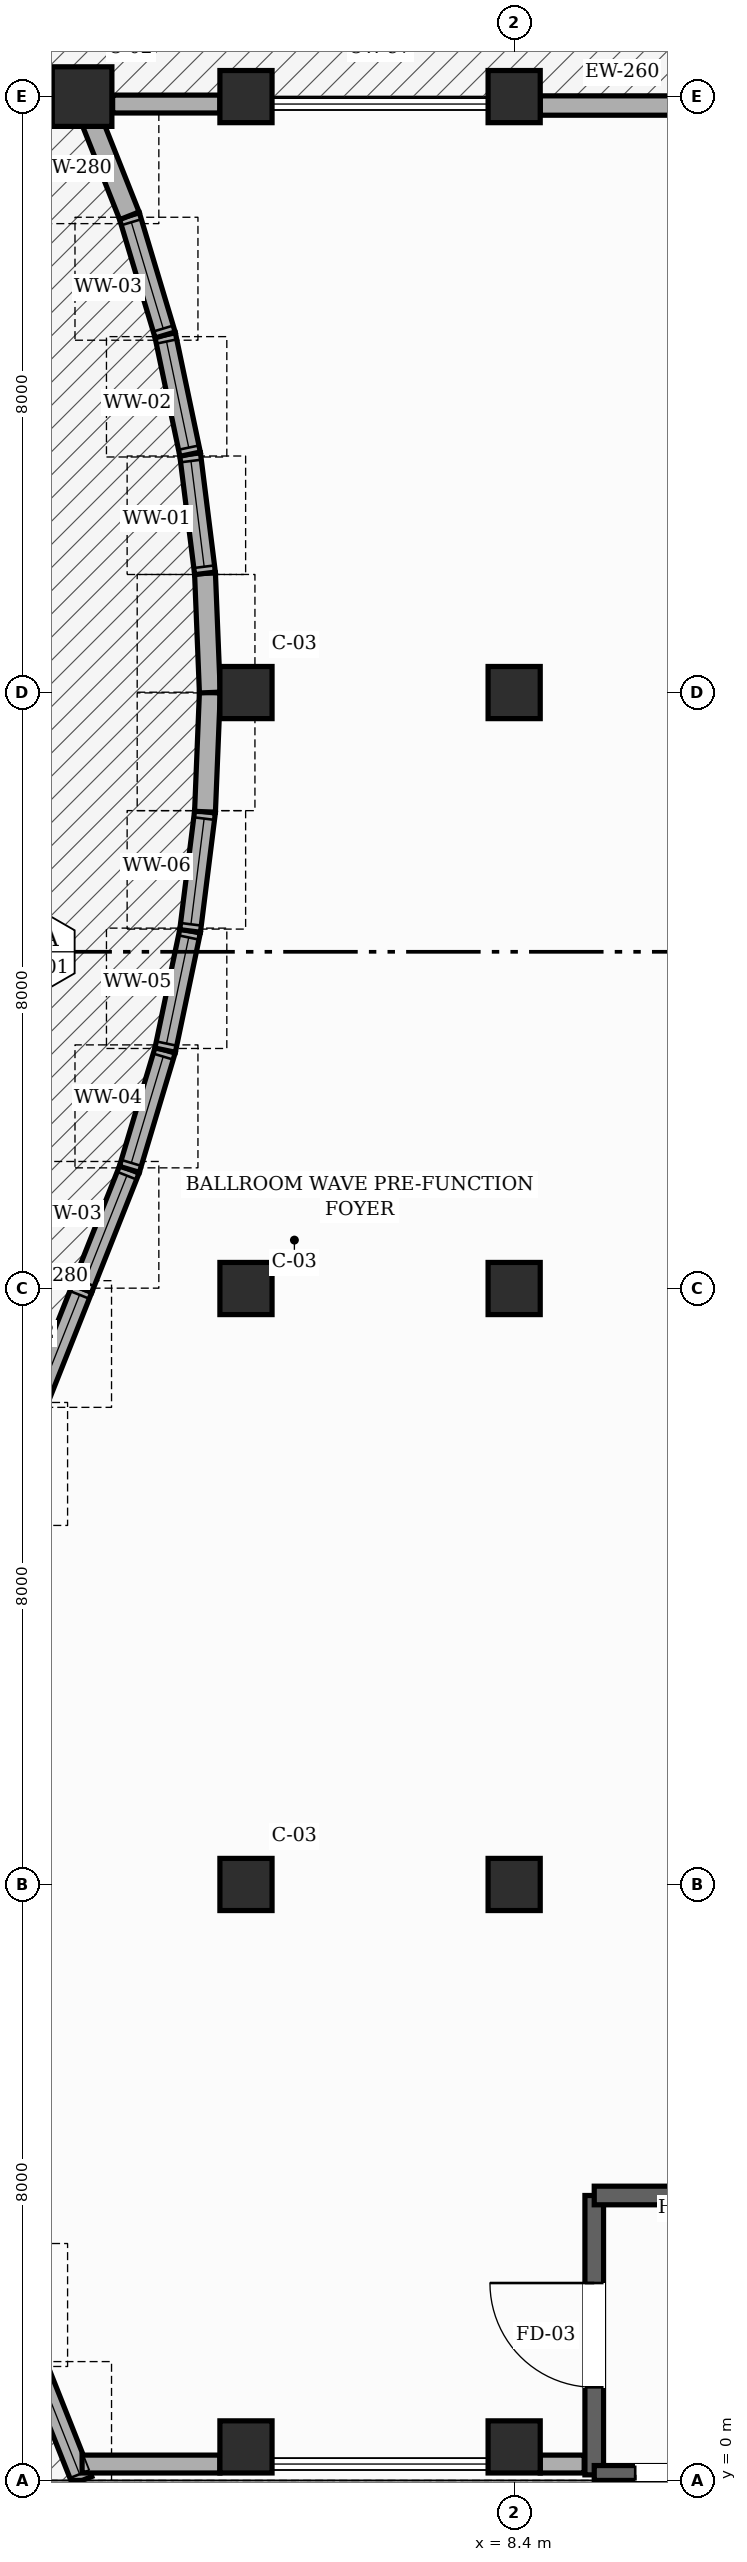
"""IFC4 building model, lengths in metres.
Left out: names, types, materials, properties, quantities, classifications, styles, units other than length and angle.
Written with IfcOpenShell. Run it as: python <this file> out.ifc"""

import sys

from ifc_helpers import new_model, si_unit, direction, frame, frame_2d, origin, origin_2d, place, context, subcontext, project, spatial, polyline, rectangle, hollow_rectangle, outline, extrude, element, fill, save


model = new_model("IFC4")
c1 = context("Model", 3, precision=1e-05, world=origin(), true_north=direction((0.0, 1.0)))
c2 = subcontext(c1, "Body", "Model", "MODEL_VIEW")
j1 = project(units=[si_unit("LENGTHUNIT", "METRE"), si_unit("PLANEANGLEUNIT", "RADIAN")], contexts=[c1])
p1 = place(None, origin())
s1 = spatial("IfcSite", under=j1, at=p1, CompositionType="ELEMENT")
p2 = place(p1, origin())
s2 = spatial("IfcBuilding", under=s1, at=p2, CompositionType="ELEMENT")
p3 = place(p2, origin())
s3 = spatial("IfcBuildingStorey", under=s2, at=p3, CompositionType="ELEMENT", Elevation=0.0)
p4 = place(p3, frame((2.6, 32.0, 0.0), z_axis=(0.0, 0.0, 1.0), x_axis=(1.0, 0.0, 0.0)))
e1 = element("IfcColumn", 1, at=p4, inside=s3, PredefinedType="COLUMN", context=c2, shape_type="SweptSolid", body=[
    extrude(hollow_rectangle(XDim=0.8, YDim=0.8, WallThickness=0.032, InnerFilletRadius=0.032, OuterFilletRadius=0.064, at=origin_2d()), origin(), (0.0, 0.0, 1.0), 5.15),
])
for number, where, z_axis, x_axis in (
    (2, (4.8, 0.45, 0.0), (0.0, 0.0, 1.0), (1.0, 0.0, 0.0)),
    (3, (4.8, 8.0, 0.0), (0.0, 0.0, 1.0), (1.0, 0.0, 0.0)),
    (4, (4.8, 16.0, 0.0), (0.0, 0.0, 1.0), (1.0, 0.0, 0.0)),
    (5, (4.8, 24.0, 0.0), (0.0, 0.0, 1.0), (1.0, 0.0, 0.0)),
    (6, (4.8, 32.0, 0.0), (0.0, 0.0, 1.0), (1.0, 0.0, 0.0)),
    (7, (8.4, 0.45, 0.0), (0.0, 0.0, 1.0), (1.0, 0.0, 0.0)),
    (8, (8.4, 8.0, 0.0), (0.0, 0.0, 1.0), (1.0, 0.0, 0.0)),
    (9, (8.4, 16.0, 0.0), (0.0, 0.0, 1.0), (1.0, 0.0, 0.0)),
    (10, (8.4, 24.0, 0.0), (0.0, 0.0, 1.0), (1.0, 0.0, 0.0)),
    (11, (8.4, 32.0, 0.0), (0.0, 0.0, 1.0), (1.0, 0.0, 0.0)),
):
    element("IfcColumn", number, at=place(p3, frame(where, z_axis=z_axis, x_axis=x_axis)), inside=s3, PredefinedType="COLUMN", context=c2, shape_type="SweptSolid", body=[
        extrude(hollow_rectangle(XDim=0.7, YDim=0.7, WallThickness=0.028, InnerFilletRadius=0.028, OuterFilletRadius=0.056, at=origin_2d()), origin(), (0.0, 0.0, 1.0), 5.4),
    ])
p5 = place(p3, frame((2.6, 0.0, 0.0), z_axis=(0.0, 0.0, 1.0), x_axis=(-0.368870803066, 0.92948067793, 0.0)))
e12 = element("IfcWall", 12, at=p5, inside=s3, PredefinedType="SOLIDWALL", context=c2, shape_type="SweptSolid", body=[
    extrude(outline(polyline([(0.0, 0.0), (1.721, 0.0), (1.72, 15.12), (1.505, 15.04), (1.29, 14.95), (1.075, 14.865), (0.86, 14.775), (0.645, 14.68), (0.43, 14.59), (0.215, 14.495), (0.0, 14.4), (0.0, 0.0)])), frame((0.0, 0.14, 0.0), z_axis=(0.0, -1.0, 0.0), x_axis=(1.0, 0.0, 0.0)), (0.0, 0.0, 1.0), 0.28),
])
p6 = place(p5, frame((0.09, 0.0, 1.125)))
e13 = element("IfcOpeningElement", 13, at=p6, cuts=e12, PredefinedType="OPENING", context=c2, shape_type="SweptSolid", body=[
    extrude(rectangle(XDim=1.54, YDim=1.65, at=frame_2d((0.77, 0.825))), frame((0.0, 0.15, 0.0), z_axis=(0.0, -1.0, 0.0), x_axis=(1.0, 0.0, 0.0)), (0.0, 0.0, 1.0), 0.3),
])
p7 = place(p3, frame((1.965, 14.4, 0.0), z_axis=(0.0, 0.0, 1.0), x_axis=(0.368870803066, 0.92948067793, 0.0)))
e14 = element("IfcWall", 14, at=p7, inside=s3, PredefinedType="SOLIDWALL", context=c2, shape_type="SweptSolid", body=[
    extrude(outline(polyline([(0.0, 0.0), (1.721, 0.0), (1.72, 13.145), (1.505, 13.105), (1.29, 13.075), (1.075, 13.045), (0.86, 13.025), (0.645, 13.01), (0.43, 13.0), (0.215, 13.0), (0.0, 13.005), (0.0, 0.0)])), frame((0.0, 0.14, 0.0), z_axis=(0.0, -1.0, 0.0), x_axis=(1.0, 0.0, 0.0)), (0.0, 0.0, 1.0), 0.28),
])
p8 = place(p7, frame((0.09, 0.0, 0.31)))
e15 = element("IfcOpeningElement", 15, at=p8, cuts=e14, PredefinedType="OPENING", context=c2, shape_type="SweptSolid", body=[
    extrude(rectangle(XDim=1.54, YDim=1.75, at=frame_2d((0.77, 0.875))), frame((0.0, 0.15, 0.0), z_axis=(0.0, -1.0, 0.0), x_axis=(1.0, 0.0, 0.0)), (0.0, 0.0, 1.0), 0.3),
])
p9 = place(p3, frame((2.6, 16.0, 0.0), z_axis=(0.0, 0.0, 1.0), x_axis=(0.368870803066, 0.92948067793, 0.0)))
e16 = element("IfcWall", 16, at=p9, inside=s3, PredefinedType="SOLIDWALL", context=c2, shape_type="SweptSolid", body=[
    extrude(outline(polyline([(0.0, 0.0), (1.721, 0.0), (1.72, 13.645), (1.505, 13.57), (1.29, 13.495), (1.075, 13.425), (0.86, 13.36), (0.645, 13.3), (0.43, 13.24), (0.215, 13.19), (0.0, 13.145), (0.0, 0.0)])), frame((0.0, 0.14, 0.0), z_axis=(0.0, -1.0, 0.0), x_axis=(1.0, 0.0, 0.0)), (0.0, 0.0, 1.0), 0.28),
])
p10 = place(p9, frame((0.09, 0.0, 0.465)))
e17 = element("IfcOpeningElement", 17, at=p10, cuts=e16, PredefinedType="OPENING", context=c2, shape_type="SweptSolid", body=[
    extrude(rectangle(XDim=1.54, YDim=1.85, at=frame_2d((0.77, 0.925))), frame((0.0, 0.15, 0.0), z_axis=(0.0, -1.0, 0.0), x_axis=(1.0, 0.0, 0.0)), (0.0, 0.0, 1.0), 0.3),
])
p11 = place(p3, frame((3.235, 17.6, 0.0), z_axis=(0.0, 0.0, 1.0), x_axis=(0.287361295213, 0.957822262225, 0.0)))
e18 = element("IfcWall", 18, at=p11, inside=s3, PredefinedType="SOLIDWALL", context=c2, shape_type="SweptSolid", body=[
    extrude(outline(polyline([(0.0, 0.0), (1.67, 0.0), (1.67, 14.34), (1.46, 14.245), (1.25, 14.155), (1.045, 14.065), (0.835, 13.98), (0.625, 13.89), (0.42, 13.805), (0.21, 13.725), (0.0, 13.645), (0.0, 0.0)])), frame((0.0, 0.14, 0.0), z_axis=(0.0, -1.0, 0.0), x_axis=(1.0, 0.0, 0.0)), (0.0, 0.0, 1.0), 0.28),
])
p12 = place(p11, frame((0.09, 0.0, 0.755)))
e19 = element("IfcOpeningElement", 19, at=p12, cuts=e18, PredefinedType="OPENING", context=c2, shape_type="SweptSolid", body=[
    extrude(rectangle(XDim=1.49, YDim=1.95, at=frame_2d((0.745, 0.975))), frame((0.0, 0.15, 0.0), z_axis=(0.0, -1.0, 0.0), x_axis=(1.0, 0.0, 0.0)), (0.0, 0.0, 1.0), 0.3),
])
p13 = place(p3, frame((3.715, 19.2, 0.0), z_axis=(0.0, 0.0, 1.0), x_axis=(0.204896426963, 0.97878366058, 0.0)))
e20 = element("IfcWall", 20, at=p13, inside=s3, PredefinedType="SOLIDWALL", context=c2, shape_type="SweptSolid", body=[
    extrude(outline(polyline([(0.0, 0.0), (1.635, 0.0), (1.635, 15.035), (1.43, 14.95), (1.225, 14.87), (1.02, 14.785), (0.82, 14.695), (0.615, 14.605), (0.41, 14.52), (0.205, 14.43), (0.0, 14.34), (0.0, 0.0)])), frame((0.0, 0.14, 0.0), z_axis=(0.0, -1.0, 0.0), x_axis=(1.0, 0.0, 0.0)), (0.0, 0.0, 1.0), 0.28),
])
p14 = place(p13, frame((0.09, 0.0, 1.085)))
e21 = element("IfcOpeningElement", 21, at=p14, cuts=e20, PredefinedType="OPENING", context=c2, shape_type="SweptSolid", body=[
    extrude(rectangle(XDim=1.455, YDim=1.8, at=frame_2d((0.728, 0.9))), frame((0.0, 0.15, 0.0), z_axis=(0.0, -1.0, 0.0), x_axis=(1.0, 0.0, 0.0)), (0.0, 0.0, 1.0), 0.3),
])
p15 = place(p3, frame((4.05, 20.8, 0.0), z_axis=(0.0, 0.0, 1.0), x_axis=(0.124016097791, 0.992280206136, 0.0)))
e22 = element("IfcWall", 22, at=p15, inside=s3, PredefinedType="SOLIDWALL", context=c2, shape_type="SweptSolid", body=[
    extrude(outline(polyline([(0.0, 0.0), (1.612, 0.0), (1.61, 15.56), (1.41, 15.505), (1.21, 15.45), (1.005, 15.39), (0.805, 15.325), (0.605, 15.26), (0.4, 15.185), (0.2, 15.11), (0.0, 15.035), (0.0, 0.0)])), frame((0.0, 0.14, 0.0), z_axis=(0.0, -1.0, 0.0), x_axis=(1.0, 0.0, 0.0)), (0.0, 0.0, 1.0), 0.28),
])
p16 = place(p15, frame((0.09, 0.0, 1.38)))
e23 = element("IfcOpeningElement", 23, at=p16, cuts=e22, PredefinedType="OPENING", context=c2, shape_type="SweptSolid", body=[
    extrude(rectangle(XDim=1.43, YDim=2.0, at=frame_2d((0.715, 1.0))), frame((0.0, 0.15, 0.0), z_axis=(0.0, -1.0, 0.0), x_axis=(1.0, 0.0, 0.0)), (0.0, 0.0, 1.0), 0.3),
])
p17 = place(p3, frame((4.25, 22.4, 0.0), z_axis=(0.0, 0.0, 1.0), x_axis=(0.040552516117, 0.99917740839, 0.0)))
e24 = element("IfcWall", 24, at=p17, inside=s3, PredefinedType="SOLIDWALL", context=c2, shape_type="SweptSolid", body=[
    extrude(outline(polyline([(0.0, 0.0), (1.601, 0.0), (1.6, 15.795), (1.4, 15.785), (1.2, 15.765), (1.0, 15.745), (0.8, 15.72), (0.6, 15.685), (0.4, 15.65), (0.2, 15.605), (0.0, 15.56), (0.0, 0.0)])), frame((0.0, 0.14, 0.0), z_axis=(0.0, -1.0, 0.0), x_axis=(1.0, 0.0, 0.0)), (0.0, 0.0, 1.0), 0.28),
])
p18 = place(p3, frame((4.315, 24.0, 0.0), z_axis=(0.0, 0.0, 1.0), x_axis=(-0.040552516117, 0.99917740839, 0.0)))
e25 = element("IfcWall", 25, at=p18, inside=s3, PredefinedType="SOLIDWALL", context=c2, shape_type="SweptSolid", body=[
    extrude(outline(polyline([(0.0, 0.0), (1.601, 0.0), (1.6, 15.685), (1.4, 15.715), (1.2, 15.745), (1.0, 15.765), (0.8, 15.78), (0.6, 15.795), (0.4, 15.8), (0.2, 15.8), (0.0, 15.795), (0.0, 0.0)])), frame((0.0, 0.14, 0.0), z_axis=(0.0, -1.0, 0.0), x_axis=(1.0, 0.0, 0.0)), (0.0, 0.0, 1.0), 0.28),
])
p19 = place(p3, frame((4.25, 25.6, 0.0), z_axis=(0.0, 0.0, 1.0), x_axis=(-0.124016097791, 0.992280206136, 0.0)))
e26 = element("IfcWall", 26, at=p19, inside=s3, PredefinedType="SOLIDWALL", context=c2, shape_type="SweptSolid", body=[
    extrude(outline(polyline([(0.0, 0.0), (1.612, 0.0), (1.61, 15.255), (1.41, 15.32), (1.21, 15.385), (1.005, 15.445), (0.805, 15.505), (0.605, 15.555), (0.4, 15.605), (0.2, 15.645), (0.0, 15.685), (0.0, 0.0)])), frame((0.0, 0.14, 0.0), z_axis=(0.0, -1.0, 0.0), x_axis=(1.0, 0.0, 0.0)), (0.0, 0.0, 1.0), 0.28),
])
p20 = place(p19, frame((0.09, 0.0, 1.46)))
e27 = element("IfcOpeningElement", 27, at=p20, cuts=e26, PredefinedType="OPENING", context=c2, shape_type="SweptSolid", body=[
    extrude(rectangle(XDim=1.43, YDim=1.65, at=frame_2d((0.715, 0.825))), frame((0.0, 0.15, 0.0), z_axis=(0.0, -1.0, 0.0), x_axis=(1.0, 0.0, 0.0)), (0.0, 0.0, 1.0), 0.3),
])
p21 = place(p3, frame((4.05, 27.2, 0.0), z_axis=(0.0, 0.0, 1.0), x_axis=(-0.204896426963, 0.97878366058, 0.0)))
e28 = element("IfcWall", 28, at=p21, inside=s3, PredefinedType="SOLIDWALL", context=c2, shape_type="SweptSolid", body=[
    extrude(outline(polyline([(0.0, 0.0), (1.635, 0.0), (1.635, 14.595), (1.43, 14.685), (1.225, 14.775), (1.02, 14.86), (0.82, 14.945), (0.615, 15.025), (0.41, 15.105), (0.205, 15.18), (0.0, 15.255), (0.0, 0.0)])), frame((0.0, 0.14, 0.0), z_axis=(0.0, -1.0, 0.0), x_axis=(1.0, 0.0, 0.0)), (0.0, 0.0, 1.0), 0.28),
])
p22 = place(p21, frame((0.09, 0.0, 1.2)))
e29 = element("IfcOpeningElement", 29, at=p22, cuts=e28, PredefinedType="OPENING", context=c2, shape_type="SweptSolid", body=[
    extrude(rectangle(XDim=1.455, YDim=1.75, at=frame_2d((0.728, 0.875))), frame((0.0, 0.15, 0.0), z_axis=(0.0, -1.0, 0.0), x_axis=(1.0, 0.0, 0.0)), (0.0, 0.0, 1.0), 0.3),
])
p23 = place(p3, frame((3.715, 28.8, 0.0), z_axis=(0.0, 0.0, 1.0), x_axis=(-0.287361295213, 0.957822262225, 0.0)))
e30 = element("IfcWall", 30, at=p23, inside=s3, PredefinedType="SOLIDWALL", context=c2, shape_type="SweptSolid", body=[
    extrude(outline(polyline([(0.0, 0.0), (1.67, 0.0), (1.67, 13.875), (1.46, 13.965), (1.25, 14.05), (1.045, 14.14), (0.835, 14.23), (0.625, 14.325), (0.42, 14.415), (0.21, 14.505), (0.0, 14.595), (0.0, 0.0)])), frame((0.0, 0.14, 0.0), z_axis=(0.0, -1.0, 0.0), x_axis=(1.0, 0.0, 0.0)), (0.0, 0.0, 1.0), 0.28),
])
p24 = place(p23, frame((0.09, 0.0, 0.87)))
e31 = element("IfcOpeningElement", 31, at=p24, cuts=e30, PredefinedType="OPENING", context=c2, shape_type="SweptSolid", body=[
    extrude(rectangle(XDim=1.49, YDim=1.85, at=frame_2d((0.745, 0.925))), frame((0.0, 0.15, 0.0), z_axis=(0.0, -1.0, 0.0), x_axis=(1.0, 0.0, 0.0)), (0.0, 0.0, 1.0), 0.3),
])
p25 = place(p3, frame((3.235, 30.4, 0.0), z_axis=(0.0, 0.0, 1.0), x_axis=(-0.368870803066, 0.92948067793, 0.0)))
e32 = element("IfcWall", 32, at=p25, inside=s3, PredefinedType="SOLIDWALL", context=c2, shape_type="SweptSolid", body=[
    extrude(outline(polyline([(0.0, 0.0), (1.721, 0.0), (1.72, 13.285), (1.505, 13.345), (1.29, 13.405), (1.075, 13.475), (0.86, 13.55), (0.645, 13.625), (0.43, 13.705), (0.215, 13.79), (0.0, 13.875), (0.0, 0.0)])), frame((0.0, 0.14, 0.0), z_axis=(0.0, -1.0, 0.0), x_axis=(1.0, 0.0, 0.0)), (0.0, 0.0, 1.0), 0.28),
])
p26 = place(p3, frame((8.75, 31.88, 0.0), z_axis=(0.0, 0.0, 1.0), x_axis=(1.0, 0.0, 0.0)))
e33 = element("IfcWall", 33, at=p26, inside=s3, PredefinedType="SOLIDWALL", context=c2, shape_type="SweptSolid", body=[
    extrude(rectangle(XDim=7.7, YDim=0.26, at=frame_2d((3.85, 0.0))), origin(), (0.0, 0.0, 1.0), 4.475),
])
p27 = place(p26, frame((2.35, 0.0, 0.0)))
e34 = element("IfcOpeningElement", 34, at=p27, cuts=e33, PredefinedType="OPENING", context=c2, shape_type="SweptSolid", body=[
    extrude(rectangle(XDim=3.0, YDim=2.8, at=frame_2d((1.5, 1.4))), frame((0.0, 0.14, 0.0), z_axis=(0.0, -1.0, 0.0), x_axis=(1.0, 0.0, 0.0)), (0.0, 0.0, 1.0), 0.28),
])
p28 = place(p3, frame((3.01, 31.9, 0.0), z_axis=(0.0, 0.0, 1.0), x_axis=(1.0, 0.0, 0.0)))
e35 = element("IfcWall", 35, at=p28, inside=s3, PredefinedType="SOLIDWALL", context=c2, shape_type="SweptSolid", body=[
    extrude(rectangle(XDim=1.44, YDim=0.24, at=frame_2d((0.72, 0.0))), origin(), (0.0, 0.0, 1.0), 5.135),
])
p29 = place(p3, frame((4.45, 0.22, 0.0), z_axis=(0.0, 0.0, 1.0), x_axis=(-1.0, 0.0, 0.0)))
e36 = element("IfcWall", 36, at=p29, inside=s3, PredefinedType="SOLIDWALL", context=c2, shape_type="SweptSolid", body=[
    extrude(rectangle(XDim=1.85, YDim=0.24, at=frame_2d((0.925, 0.0))), origin(), (0.0, 0.0, 1.0), 5.135),
])
p30 = place(p3, frame((9.34, 0.22, 0.0), z_axis=(0.0, 0.0, 1.0), x_axis=(-1.0, 0.0, 0.0)))
e37 = element("IfcWall", 37, at=p30, inside=s3, PredefinedType="SOLIDWALL", context=c2, shape_type="SweptSolid", body=[
    extrude(rectangle(XDim=0.59, YDim=0.24, at=frame_2d((0.295, 0.0))), origin(), (0.0, 0.0, 1.0), 5.135),
])
p31 = place(p3, frame((9.475, 0.075, 0.0), z_axis=(0.0, 0.0, 1.0), x_axis=(0.0, 1.0, 0.0)))
e38 = element("IfcWall", 38, at=p31, inside=s3, PredefinedType="SHEAR", context=c2, shape_type="SweptSolid", body=[
    extrude(rectangle(XDim=3.75, YDim=0.25, at=frame_2d((1.875, 0.0))), origin(), (0.0, 0.0, 1.0), 5.15),
])
p32 = place(p31, frame((1.175, 0.0, 0.0)))
e39 = element("IfcOpeningElement", 39, at=p32, cuts=e38, PredefinedType="OPENING", context=c2, shape_type="SweptSolid", body=[
    extrude(rectangle(XDim=1.4, YDim=2.25, at=frame_2d((0.7, 1.125))), frame((0.0, 0.135, 0.0), z_axis=(0.0, -1.0, 0.0), x_axis=(1.0, 0.0, 0.0)), (0.0, 0.0, 1.0), 0.27),
])
p33 = place(p3, frame((18.025, 0.075, 0.0), z_axis=(0.0, 0.0, 1.0), x_axis=(-1.0, 0.0, 0.0)))
e40 = element("IfcWall", 40, at=p33, inside=s3, PredefinedType="SHEAR", context=c2, shape_type="SweptSolid", body=[
    extrude(rectangle(XDim=8.55, YDim=0.25, at=frame_2d((4.275, 0.0))), origin(), (0.0, 0.0, 1.0), 5.15),
])
p34 = place(p33, frame((6.65, 0.0, 0.0)))
e41 = element("IfcOpeningElement", 41, at=p34, cuts=e40, PredefinedType="OPENING", context=c2, shape_type="SweptSolid", body=[
    extrude(rectangle(XDim=1.35, YDim=2.3, at=frame_2d((0.675, 1.15))), frame((0.0, 0.135, 0.0), z_axis=(0.0, -1.0, 0.0), x_axis=(1.0, 0.0, 0.0)), (0.0, 0.0, 1.0), 0.27),
])
p35 = place(p3, frame((9.475, 3.825, 0.0), z_axis=(0.0, 0.0, 1.0), x_axis=(1.0, 0.0, 0.0)))
e42 = element("IfcWall", 42, at=p35, inside=s3, PredefinedType="SHEAR", context=c2, shape_type="SweptSolid", body=[
    extrude(rectangle(XDim=8.55, YDim=0.25, at=frame_2d((4.275, 0.0))), origin(), (0.0, 0.0, 1.0), 5.15),
])
p36 = place(p6, origin())
e43 = element("IfcWindow", 43, at=p36, inside=s3, PartitioningType="SINGLE_PANEL", PredefinedType="WINDOW", context=c2, shape_type="SweptSolid", body=[
    extrude(rectangle(XDim=1.54, YDim=1.65, at=frame_2d((0.77, 0.825))), frame((0.0, 0.03, 0.0), z_axis=(0.0, -1.0, 0.0), x_axis=(1.0, 0.0, 0.0)), (0.0, 0.0, 1.0), 0.06),
])
fill(e13, e43)
p37 = place(p8, origin())
e44 = element("IfcWindow", 44, at=p37, inside=s3, PartitioningType="SINGLE_PANEL", PredefinedType="WINDOW", context=c2, shape_type="SweptSolid", body=[
    extrude(rectangle(XDim=1.54, YDim=1.75, at=frame_2d((0.77, 0.875))), frame((0.0, 0.03, 0.0), z_axis=(0.0, -1.0, 0.0), x_axis=(1.0, 0.0, 0.0)), (0.0, 0.0, 1.0), 0.06),
])
fill(e15, e44)
p38 = place(p10, origin())
e45 = element("IfcWindow", 45, at=p38, inside=s3, PartitioningType="SINGLE_PANEL", PredefinedType="WINDOW", context=c2, shape_type="SweptSolid", body=[
    extrude(rectangle(XDim=1.54, YDim=1.85, at=frame_2d((0.77, 0.925))), frame((0.0, 0.03, 0.0), z_axis=(0.0, -1.0, 0.0), x_axis=(1.0, 0.0, 0.0)), (0.0, 0.0, 1.0), 0.06),
])
fill(e17, e45)
p39 = place(p12, origin())
e46 = element("IfcWindow", 46, at=p39, inside=s3, PartitioningType="SINGLE_PANEL", PredefinedType="WINDOW", context=c2, shape_type="SweptSolid", body=[
    extrude(rectangle(XDim=1.49, YDim=1.95, at=frame_2d((0.745, 0.975))), frame((0.0, 0.03, 0.0), z_axis=(0.0, -1.0, 0.0), x_axis=(1.0, 0.0, 0.0)), (0.0, 0.0, 1.0), 0.06),
])
fill(e19, e46)
p40 = place(p14, origin())
e47 = element("IfcWindow", 47, at=p40, inside=s3, PartitioningType="SINGLE_PANEL", PredefinedType="WINDOW", context=c2, shape_type="SweptSolid", body=[
    extrude(rectangle(XDim=1.455, YDim=1.8, at=frame_2d((0.728, 0.9))), frame((0.0, 0.03, 0.0), z_axis=(0.0, -1.0, 0.0), x_axis=(1.0, 0.0, 0.0)), (0.0, 0.0, 1.0), 0.06),
])
fill(e21, e47)
p41 = place(p16, origin())
e48 = element("IfcWindow", 48, at=p41, inside=s3, PartitioningType="SINGLE_PANEL", PredefinedType="WINDOW", context=c2, shape_type="SweptSolid", body=[
    extrude(rectangle(XDim=1.43, YDim=2.0, at=frame_2d((0.715, 1.0))), frame((0.0, 0.03, 0.0), z_axis=(0.0, -1.0, 0.0), x_axis=(1.0, 0.0, 0.0)), (0.0, 0.0, 1.0), 0.06),
])
fill(e23, e48)
p42 = place(p20, origin())
e49 = element("IfcWindow", 49, at=p42, inside=s3, PartitioningType="SINGLE_PANEL", PredefinedType="WINDOW", context=c2, shape_type="SweptSolid", body=[
    extrude(rectangle(XDim=1.43, YDim=1.65, at=frame_2d((0.715, 0.825))), frame((0.0, 0.03, 0.0), z_axis=(0.0, -1.0, 0.0), x_axis=(1.0, 0.0, 0.0)), (0.0, 0.0, 1.0), 0.06),
])
fill(e27, e49)
p43 = place(p22, origin())
e50 = element("IfcWindow", 50, at=p43, inside=s3, PartitioningType="SINGLE_PANEL", PredefinedType="WINDOW", context=c2, shape_type="SweptSolid", body=[
    extrude(rectangle(XDim=1.455, YDim=1.75, at=frame_2d((0.728, 0.875))), frame((0.0, 0.03, 0.0), z_axis=(0.0, -1.0, 0.0), x_axis=(1.0, 0.0, 0.0)), (0.0, 0.0, 1.0), 0.06),
])
fill(e29, e50)
p44 = place(p24, origin())
e51 = element("IfcWindow", 51, at=p44, inside=s3, PartitioningType="SINGLE_PANEL", PredefinedType="WINDOW", context=c2, shape_type="SweptSolid", body=[
    extrude(rectangle(XDim=1.49, YDim=1.85, at=frame_2d((0.745, 0.925))), frame((0.0, 0.03, 0.0), z_axis=(0.0, -1.0, 0.0), x_axis=(1.0, 0.0, 0.0)), (0.0, 0.0, 1.0), 0.06),
])
fill(e31, e51)
p45 = place(p32, origin())
e52 = element("IfcDoor", 52, at=p45, inside=s3, OperationType="SINGLE_SWING_RIGHT", PredefinedType="DOOR", context=c2, shape_type="SweptSolid", body=[
    extrude(rectangle(XDim=1.4, YDim=2.25, at=frame_2d((0.7, 1.125))), frame((0.0, 0.025, 0.0), z_axis=(0.0, -1.0, 0.0), x_axis=(1.0, 0.0, 0.0)), (0.0, 0.0, 1.0), 0.05),
])
fill(e39, e52)
p46 = place(p34, origin())
e53 = element("IfcDoor", 53, at=p46, inside=s3, OperationType="SINGLE_SWING_RIGHT", PredefinedType="DOOR", context=c2, shape_type="SweptSolid", body=[
    extrude(rectangle(XDim=1.35, YDim=2.3, at=frame_2d((0.675, 1.15))), frame((0.0, 0.025, 0.0), z_axis=(0.0, -1.0, 0.0), x_axis=(1.0, 0.0, 0.0)), (0.0, 0.0, 1.0), 0.05),
])
fill(e41, e53)
save(model, sys.argv[1])
